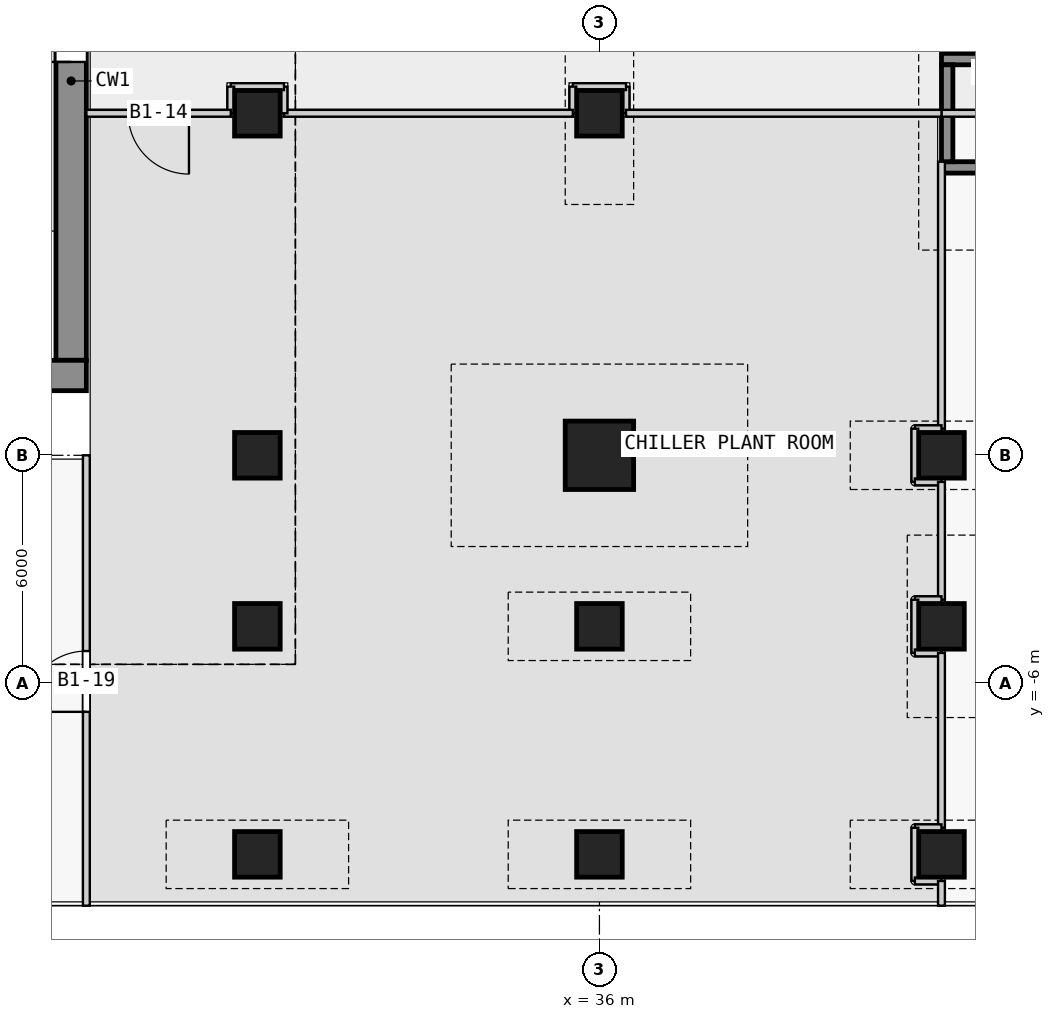
"""IFC4 building model, lengths in metres.
Left out: names, types, materials, properties, quantities, classifications, styles, units other than length and angle.
Written with IfcOpenShell. Run it as: python <this file> out.ifc"""

import sys

from ifc_helpers import new_model, si_unit, direction, frame, frame_2d, origin, origin_2d, place, context, subcontext, project, spatial, rectangle, extrude, element, fill, save


model = new_model("IFC4")
c1 = context("Model", 3, precision=1e-05, world=origin(), true_north=direction((0.0, 1.0)))
c2 = subcontext(c1, "Body", "Model", "MODEL_VIEW")
j1 = project(units=[si_unit("LENGTHUNIT", "METRE"), si_unit("PLANEANGLEUNIT", "RADIAN")], contexts=[c1])
p1 = place(None, origin())
s1 = spatial("IfcSite", under=j1, at=p1, CompositionType="ELEMENT")
p2 = place(p1, origin())
s2 = spatial("IfcBuilding", under=s1, at=p2, CompositionType="ELEMENT")
p3 = place(p2, frame((0.0, 0.0, -7.0)))
s3 = spatial("IfcBuildingStorey", under=s2, at=p3, CompositionType="ELEMENT", Elevation=-7.0)
for number, where, z_axis, x_axis in (
    (1, (27.0, -10.5, 0.0), (0.0, 0.0, 1.0), (1.0, 0.0, 0.0)),
    (2, (27.0, -4.5, 0.0), (0.0, 0.0, 1.0), (1.0, 0.0, 0.0)),
    (3, (27.0, 0.0, 0.0), (0.0, 0.0, 1.0), (1.0, 0.0, 0.0)),
    (4, (27.0, 9.0, 0.0), (0.0, 0.0, 1.0), (1.0, 0.0, 0.0)),
    (5, (36.0, -10.5, 0.0), (0.0, 0.0, 1.0), (1.0, 0.0, 0.0)),
    (6, (36.0, -4.5, 0.0), (0.0, 0.0, 1.0), (1.0, 0.0, 0.0)),
):
    element("IfcColumn", number, at=place(p3, frame(where, z_axis=z_axis, x_axis=x_axis)), inside=s3, PredefinedType="COLUMN", context=c2, shape_type="SweptSolid", body=[
        extrude(rectangle(XDim=1.2, YDim=1.2, at=origin_2d()), origin(), (0.0, 0.0, 1.0), 7.0),
    ])
p4 = place(p3, frame((36.0, 0.0, 0.0), z_axis=(0.0, 0.0, 1.0), x_axis=(1.0, 0.0, 0.0)))
e7 = element("IfcColumn", 7, at=p4, inside=s3, PredefinedType="COLUMN", context=c2, shape_type="SweptSolid", body=[
    extrude(rectangle(XDim=1.8, YDim=1.8, at=origin_2d()), origin(), (0.0, 0.0, 1.0), 7.0),
])
for number, where, z_axis, x_axis in (
    (8, (36.0, 9.0, 0.0), (0.0, 0.0, 1.0), (1.0, 0.0, 0.0)),
    (9, (45.0, -10.5, 0.0), (0.0, 0.0, 1.0), (1.0, 0.0, 0.0)),
    (10, (45.0, -4.5, 0.0), (0.0, 0.0, 1.0), (1.0, 0.0, 0.0)),
    (11, (45.0, 0.0, 0.0), (0.0, 0.0, 1.0), (1.0, 0.0, 0.0)),
):
    element("IfcColumn", number, at=place(p3, frame(where, z_axis=z_axis, x_axis=x_axis)), inside=s3, PredefinedType="COLUMN", context=c2, shape_type="SweptSolid", body=[
        extrude(rectangle(XDim=1.2, YDim=1.2, at=origin_2d()), origin(), (0.0, 0.0, 1.0), 7.0),
    ])
p5 = place(p3, frame((1.5, 2.1, 0.0), z_axis=(0.0, 0.0, 1.0), x_axis=(1.0, 0.0, 0.0)))
e12 = element("IfcWall", 12, at=p5, inside=s3, PredefinedType="SHEAR", context=c2, shape_type="SweptSolid", body=[
    extrude(rectangle(XDim=21.0, YDim=0.8, at=frame_2d((10.5, 0.0))), origin(), (0.0, 0.0, 1.0), 6.55),
])
p6 = place(p3, frame((22.1, 2.5, 0.0), z_axis=(0.0, 0.0, 1.0), x_axis=(0.0, 1.0, 0.0)))
e13 = element("IfcWall", 13, at=p6, inside=s3, PredefinedType="SHEAR", context=c2, shape_type="SweptSolid", body=[
    extrude(rectangle(XDim=14.7, YDim=0.8, at=frame_2d((7.35, 0.0))), origin(), (0.0, 0.0, 1.0), 6.55),
])
p7 = place(p6, frame((7.85, 0.0, 0.0)))
e14 = element("IfcOpeningElement", 14, at=p7, cuts=e13, PredefinedType="OPENING", context=c2, shape_type="SweptSolid", body=[
    extrude(rectangle(XDim=1.8, YDim=2.1, at=frame_2d((0.9, 1.05))), frame((0.0, 0.41, 0.0), z_axis=(0.0, -1.0, 0.0), x_axis=(1.0, 0.0, 0.0)), (0.0, 0.0, 1.0), 0.82),
])
p8 = place(p3, frame((45.15, 7.725, 0.0), z_axis=(0.0, 0.0, 1.0), x_axis=(0.0, 1.0, 0.0)))
e15 = element("IfcWall", 15, at=p8, inside=s3, PredefinedType="SHEAR", context=c2, shape_type="SweptSolid", body=[
    extrude(rectangle(XDim=2.55, YDim=0.3, at=frame_2d((1.275, 0.0))), origin(), (0.0, 0.0, 1.0), 6.55),
])
for number, where, z_axis, x_axis in (
    (16, (45.0, 7.575, 0.0), (0.0, 0.0, 1.0), (1.0, 0.0, 0.0)),
    (17, (45.0, 10.425, 0.0), (0.0, 0.0, 1.0), (1.0, 0.0, 0.0)),
):
    element("IfcWall", number, at=place(p3, frame(where, z_axis=z_axis, x_axis=x_axis)), inside=s3, PredefinedType="SHEAR", context=c2, shape_type="SweptSolid", body=[
        extrude(rectangle(XDim=7.2, YDim=0.3, at=frame_2d((3.6, 0.0))), origin(), (0.0, 0.0, 1.0), 6.55),
    ])
p9 = place(p3, frame((45.0, 7.725, 0.0), z_axis=(0.0, 0.0, 1.0), x_axis=(0.0, -1.0, 0.0)))
e18 = element("IfcWall", 18, at=p9, inside=s3, PredefinedType="PARTITIONING", context=c2, shape_type="SweptSolid", body=[
    extrude(rectangle(XDim=7.025, YDim=0.18, at=frame_2d((3.513, 0.0))), origin(), (0.0, 0.0, 1.0), 6.55),
])
p10 = place(p3, frame((45.0, 0.7, 0.0), z_axis=(0.0, 0.0, 1.0), x_axis=(-1.0, 0.0, 0.0)))
e19 = element("IfcWall", 19, at=p10, inside=s3, PredefinedType="PARTITIONING", context=c2, shape_type="SweptSolid", body=[
    extrude(rectangle(XDim=0.7, YDim=0.18, at=frame_2d((0.35, 0.0))), origin(), (0.0, 0.0, 1.0), 6.55),
])
p11 = place(p3, frame((44.3, 0.7, 0.0), z_axis=(0.0, 0.0, 1.0), x_axis=(0.0, -1.0, 0.0)))
e20 = element("IfcWall", 20, at=p11, inside=s3, PredefinedType="PARTITIONING", context=c2, shape_type="SweptSolid", body=[
    extrude(rectangle(XDim=1.4, YDim=0.18, at=frame_2d((0.7, 0.0))), origin(), (0.0, 0.0, 1.0), 6.55),
])
p12 = place(p3, frame((44.3, -0.7, 0.0), z_axis=(0.0, 0.0, 1.0), x_axis=(1.0, 0.0, 0.0)))
e21 = element("IfcWall", 21, at=p12, inside=s3, PredefinedType="PARTITIONING", context=c2, shape_type="SweptSolid", body=[
    extrude(rectangle(XDim=0.7, YDim=0.18, at=frame_2d((0.35, 0.0))), origin(), (0.0, 0.0, 1.0), 6.55),
])
p13 = place(p3, frame((45.0, -0.7, 0.0), z_axis=(0.0, 0.0, 1.0), x_axis=(0.0, -1.0, 0.0)))
e22 = element("IfcWall", 22, at=p13, inside=s3, PredefinedType="PARTITIONING", context=c2, shape_type="SweptSolid", body=[
    extrude(rectangle(XDim=3.1, YDim=0.18, at=frame_2d((1.55, 0.0))), origin(), (0.0, 0.0, 1.0), 6.55),
])
p14 = place(p3, frame((45.0, -3.8, 0.0), z_axis=(0.0, 0.0, 1.0), x_axis=(-1.0, 0.0, 0.0)))
e23 = element("IfcWall", 23, at=p14, inside=s3, PredefinedType="PARTITIONING", context=c2, shape_type="SweptSolid", body=[
    extrude(rectangle(XDim=0.7, YDim=0.18, at=frame_2d((0.35, 0.0))), origin(), (0.0, 0.0, 1.0), 6.55),
])
p15 = place(p3, frame((44.3, -3.8, 0.0), z_axis=(0.0, 0.0, 1.0), x_axis=(0.0, -1.0, 0.0)))
e24 = element("IfcWall", 24, at=p15, inside=s3, PredefinedType="PARTITIONING", context=c2, shape_type="SweptSolid", body=[
    extrude(rectangle(XDim=1.4, YDim=0.18, at=frame_2d((0.7, 0.0))), origin(), (0.0, 0.0, 1.0), 6.55),
])
p16 = place(p3, frame((44.3, -5.2, 0.0), z_axis=(0.0, 0.0, 1.0), x_axis=(1.0, 0.0, 0.0)))
e25 = element("IfcWall", 25, at=p16, inside=s3, PredefinedType="PARTITIONING", context=c2, shape_type="SweptSolid", body=[
    extrude(rectangle(XDim=0.7, YDim=0.18, at=frame_2d((0.35, 0.0))), origin(), (0.0, 0.0, 1.0), 6.55),
])
p17 = place(p3, frame((45.0, -5.2, 0.0), z_axis=(0.0, 0.0, 1.0), x_axis=(0.0, -1.0, 0.0)))
e26 = element("IfcWall", 26, at=p17, inside=s3, PredefinedType="PARTITIONING", context=c2, shape_type="SweptSolid", body=[
    extrude(rectangle(XDim=4.6, YDim=0.18, at=frame_2d((2.3, 0.0))), origin(), (0.0, 0.0, 1.0), 6.55),
])
p18 = place(p3, frame((45.0, -9.8, 0.0), z_axis=(0.0, 0.0, 1.0), x_axis=(-1.0, 0.0, 0.0)))
e27 = element("IfcWall", 27, at=p18, inside=s3, PredefinedType="PARTITIONING", context=c2, shape_type="SweptSolid", body=[
    extrude(rectangle(XDim=0.7, YDim=0.18, at=frame_2d((0.35, 0.0))), origin(), (0.0, 0.0, 1.0), 6.55),
])
p19 = place(p3, frame((44.3, -9.8, 0.0), z_axis=(0.0, 0.0, 1.0), x_axis=(0.0, -1.0, 0.0)))
e28 = element("IfcWall", 28, at=p19, inside=s3, PredefinedType="PARTITIONING", context=c2, shape_type="SweptSolid", body=[
    extrude(rectangle(XDim=1.4, YDim=0.18, at=frame_2d((0.7, 0.0))), origin(), (0.0, 0.0, 1.0), 6.55),
])
p20 = place(p3, frame((44.3, -11.2, 0.0), z_axis=(0.0, 0.0, 1.0), x_axis=(1.0, 0.0, 0.0)))
e29 = element("IfcWall", 29, at=p20, inside=s3, PredefinedType="PARTITIONING", context=c2, shape_type="SweptSolid", body=[
    extrude(rectangle(XDim=0.7, YDim=0.18, at=frame_2d((0.35, 0.0))), origin(), (0.0, 0.0, 1.0), 6.55),
])
p21 = place(p3, frame((45.0, -11.2, 0.0), z_axis=(0.0, 0.0, 1.0), x_axis=(0.0, -1.0, 0.0)))
e30 = element("IfcWall", 30, at=p21, inside=s3, PredefinedType="PARTITIONING", context=c2, shape_type="SweptSolid", body=[
    extrude(rectangle(XDim=0.65, YDim=0.18, at=frame_2d((0.325, 0.0))), origin(), (0.0, 0.0, 1.0), 6.55),
])
p22 = place(p3, frame((53.3, 9.0, 0.0), z_axis=(0.0, 0.0, 1.0), x_axis=(-1.0, 0.0, 0.0)))
e31 = element("IfcWall", 31, at=p22, inside=s3, PredefinedType="PARTITIONING", context=c2, shape_type="SweptSolid", body=[
    extrude(rectangle(XDim=8.3, YDim=0.18, at=frame_2d((4.15, 0.0))), origin(), (0.0, 0.0, 1.0), 6.55),
])
p23 = place(p22, frame((3.35, 0.0, 0.0)))
e32 = element("IfcOpeningElement", 32, at=p23, cuts=e31, PredefinedType="OPENING", context=c2, shape_type="SweptSolid", body=[
    extrude(rectangle(XDim=1.6, YDim=2.4, at=frame_2d((0.8, 1.2))), frame((0.0, 0.1, 0.0), z_axis=(0.0, -1.0, 0.0), x_axis=(1.0, 0.0, 0.0)), (0.0, 0.0, 1.0), 0.2),
])
p24 = place(p3, frame((36.7, 9.0, 0.0), z_axis=(0.0, 0.0, 1.0), x_axis=(0.0, 1.0, 0.0)))
e33 = element("IfcWall", 33, at=p24, inside=s3, PredefinedType="PARTITIONING", context=c2, shape_type="SweptSolid", body=[
    extrude(rectangle(XDim=0.7, YDim=0.18, at=frame_2d((0.35, 0.0))), origin(), (0.0, 0.0, 1.0), 6.55),
])
p25 = place(p3, frame((36.7, 9.7, 0.0), z_axis=(0.0, 0.0, 1.0), x_axis=(-1.0, 0.0, 0.0)))
e34 = element("IfcWall", 34, at=p25, inside=s3, PredefinedType="PARTITIONING", context=c2, shape_type="SweptSolid", body=[
    extrude(rectangle(XDim=1.4, YDim=0.18, at=frame_2d((0.7, 0.0))), origin(), (0.0, 0.0, 1.0), 6.55),
])
p26 = place(p3, frame((35.3, 9.7, 0.0), z_axis=(0.0, 0.0, 1.0), x_axis=(0.0, -1.0, 0.0)))
e35 = element("IfcWall", 35, at=p26, inside=s3, PredefinedType="PARTITIONING", context=c2, shape_type="SweptSolid", body=[
    extrude(rectangle(XDim=0.7, YDim=0.18, at=frame_2d((0.35, 0.0))), origin(), (0.0, 0.0, 1.0), 6.55),
])
p27 = place(p3, frame((35.3, 9.0, 0.0), z_axis=(0.0, 0.0, 1.0), x_axis=(-1.0, 0.0, 0.0)))
e36 = element("IfcWall", 36, at=p27, inside=s3, PredefinedType="PARTITIONING", context=c2, shape_type="SweptSolid", body=[
    extrude(rectangle(XDim=7.6, YDim=0.18, at=frame_2d((3.8, 0.0))), origin(), (0.0, 0.0, 1.0), 6.55),
])
p28 = place(p3, frame((27.7, 9.0, 0.0), z_axis=(0.0, 0.0, 1.0), x_axis=(0.0, 1.0, 0.0)))
e37 = element("IfcWall", 37, at=p28, inside=s3, PredefinedType="PARTITIONING", context=c2, shape_type="SweptSolid", body=[
    extrude(rectangle(XDim=0.7, YDim=0.18, at=frame_2d((0.35, 0.0))), origin(), (0.0, 0.0, 1.0), 6.55),
])
p29 = place(p3, frame((27.7, 9.7, 0.0), z_axis=(0.0, 0.0, 1.0), x_axis=(-1.0, 0.0, 0.0)))
e38 = element("IfcWall", 38, at=p29, inside=s3, PredefinedType="PARTITIONING", context=c2, shape_type="SweptSolid", body=[
    extrude(rectangle(XDim=1.4, YDim=0.18, at=frame_2d((0.7, 0.0))), origin(), (0.0, 0.0, 1.0), 6.55),
])
p30 = place(p3, frame((26.3, 9.7, 0.0), z_axis=(0.0, 0.0, 1.0), x_axis=(0.0, -1.0, 0.0)))
e39 = element("IfcWall", 39, at=p30, inside=s3, PredefinedType="PARTITIONING", context=c2, shape_type="SweptSolid", body=[
    extrude(rectangle(XDim=0.7, YDim=0.18, at=frame_2d((0.35, 0.0))), origin(), (0.0, 0.0, 1.0), 6.55),
])
p31 = place(p3, frame((26.3, 9.0, 0.0), z_axis=(0.0, 0.0, 1.0), x_axis=(-1.0, 0.0, 0.0)))
e40 = element("IfcWall", 40, at=p31, inside=s3, PredefinedType="PARTITIONING", context=c2, shape_type="SweptSolid", body=[
    extrude(rectangle(XDim=3.8, YDim=0.18, at=frame_2d((1.9, 0.0))), origin(), (0.0, 0.0, 1.0), 6.55),
])
p32 = place(p31, frame((1.1, 0.0, 0.0)))
e41 = element("IfcOpeningElement", 41, at=p32, cuts=e40, PredefinedType="OPENING", context=c2, shape_type="SweptSolid", body=[
    extrude(rectangle(XDim=1.6, YDim=2.4, at=frame_2d((0.8, 1.2))), frame((0.0, 0.1, 0.0), z_axis=(0.0, -1.0, 0.0), x_axis=(1.0, 0.0, 0.0)), (0.0, 0.0, 1.0), 0.2),
])
p33 = place(p3, frame((22.5, -11.85, 0.0), z_axis=(0.0, 0.0, 1.0), x_axis=(0.0, 1.0, 0.0)))
e42 = element("IfcWall", 42, at=p33, inside=s3, PredefinedType="PARTITIONING", context=c2, shape_type="SweptSolid", body=[
    extrude(rectangle(XDim=11.85, YDim=0.18, at=frame_2d((5.925, 0.0))), origin(), (0.0, 0.0, 1.0), 6.55),
])
p34 = place(p33, frame((5.1, 0.0, 0.0)))
e43 = element("IfcOpeningElement", 43, at=p34, cuts=e42, PredefinedType="OPENING", context=c2, shape_type="SweptSolid", body=[
    extrude(rectangle(XDim=1.6, YDim=2.4, at=frame_2d((0.8, 1.2))), frame((0.0, 0.1, 0.0), z_axis=(0.0, -1.0, 0.0), x_axis=(1.0, 0.0, 0.0)), (0.0, 0.0, 1.0), 0.2),
])
p35 = place(p3, frame((45.0, 9.0, 0.0), z_axis=(0.0, 0.0, 1.0), x_axis=(-1.0, 0.0, 0.0)))
e44 = element("IfcWall", 44, at=p35, inside=s3, PredefinedType="PARTITIONING", context=c2, shape_type="SweptSolid", body=[
    extrude(rectangle(XDim=8.3, YDim=0.18, at=frame_2d((4.15, 0.0))), origin(), (0.0, 0.0, 1.0), 6.55),
])
p36 = place(p7, origin())
e45 = element("IfcDoor", 45, at=p36, inside=s3, OperationType="DOUBLE_DOOR_SINGLE_SWING", PredefinedType="DOOR", context=c2, shape_type="SweptSolid", body=[
    extrude(rectangle(XDim=1.8, YDim=2.1, at=frame_2d((0.9, 1.05))), frame((0.0, 0.025, 0.0), z_axis=(0.0, -1.0, 0.0), x_axis=(1.0, 0.0, 0.0)), (0.0, 0.0, 1.0), 0.05),
])
fill(e14, e45)
p37 = place(p32, origin())
e46 = element("IfcDoor", 46, at=p37, inside=s3, OperationType="SINGLE_SWING_LEFT", PredefinedType="DOOR", context=c2, shape_type="SweptSolid", body=[
    extrude(rectangle(XDim=1.6, YDim=2.4, at=frame_2d((0.8, 1.2))), frame((0.0, 0.025, 0.0), z_axis=(0.0, -1.0, 0.0), x_axis=(1.0, 0.0, 0.0)), (0.0, 0.0, 1.0), 0.05),
])
fill(e41, e46)
p38 = place(p34, origin())
e47 = element("IfcDoor", 47, at=p38, inside=s3, OperationType="SINGLE_SWING_LEFT", PredefinedType="DOOR", context=c2, shape_type="SweptSolid", body=[
    extrude(rectangle(XDim=1.6, YDim=2.4, at=frame_2d((0.8, 1.2))), frame((0.0, 0.025, 0.0), z_axis=(0.0, -1.0, 0.0), x_axis=(1.0, 0.0, 0.0)), (0.0, 0.0, 1.0), 0.05),
])
fill(e43, e47)
save(model, sys.argv[1])
